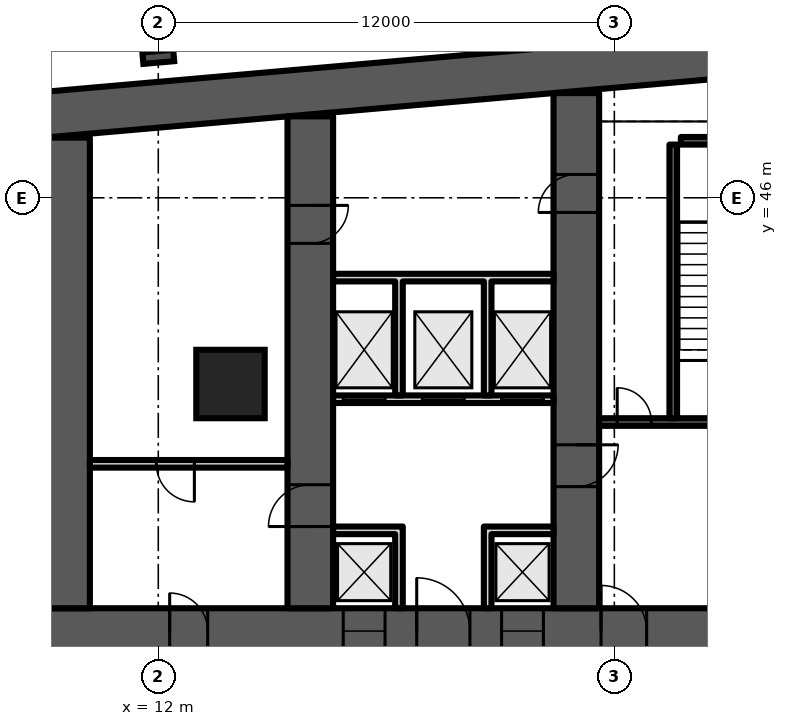
"""IFC4 building model, lengths in metres.
Left out: names, types, materials, properties, quantities, classifications, styles, units other than length and angle.
Written with IfcOpenShell. Run it as: python <this file> out.ifc"""

import sys

from ifc_helpers import new_model, si_unit, direction, frame, frame_2d, origin, origin_2d, place, context, subcontext, project, spatial, polyline, rectangle, i_section, outline, extrude, element, fill, save


model = new_model("IFC4")
c1 = context("Model", 3, precision=1e-05, world=origin(), true_north=direction((0.0, 1.0)))
c2 = subcontext(c1, "Body", "Model", "MODEL_VIEW")
j1 = project(units=[si_unit("LENGTHUNIT", "METRE"), si_unit("PLANEANGLEUNIT", "RADIAN")], contexts=[c1])
p1 = place(None, origin())
s1 = spatial("IfcSite", under=j1, at=p1, CompositionType="ELEMENT")
p2 = place(p1, origin())
s2 = spatial("IfcBuilding", under=s1, at=p2, CompositionType="ELEMENT")
p3 = place(p2, frame((0.0, 0.0, 91.9)))
s3 = spatial("IfcBuildingStorey", under=s2, at=p3, CompositionType="ELEMENT", Elevation=91.9)
p4 = place(p3, origin())
e1 = element("IfcWall", 1, at=p4, inside=s3, PredefinedType="SHEAR", context=c2, shape_type="SweptSolid", body=[
    extrude(outline(polyline([(9.0, 47.583), (37.0, 50.032), (65.0, 47.583), (65.0, 48.787), (37.0, 51.237), (9.0, 48.787), (9.0, 47.583)])), origin(), (0.0, 0.0, 1.0), 4.8),
])
p5 = place(p3, frame((9.0, 34.6, 0.0), z_axis=(0.0, 0.0, 1.0), x_axis=(1.0, 0.0, 0.0)))
e2 = element("IfcWall", 2, at=p5, inside=s3, PredefinedType="SHEAR", context=c2, shape_type="SweptSolid", body=[
    extrude(rectangle(XDim=56.0, YDim=1.2, at=frame_2d((28.0, 0.0))), origin(), (0.0, 0.0, 1.0), 4.8),
])
p6 = place(p5, frame((3.3, 0.0, 0.0)))
e3 = element("IfcOpeningElement", 3, at=p6, cuts=e2, PredefinedType="OPENING", context=c2, shape_type="SweptSolid", body=[
    extrude(rectangle(XDim=1.0, YDim=2.1, at=frame_2d((0.5, 1.05))), frame((0.0, 0.61, 0.0), z_axis=(0.0, -1.0, 0.0), x_axis=(1.0, 0.0, 0.0)), (0.0, 0.0, 1.0), 1.22),
])
p7 = place(p5, frame((7.867, 0.0, 0.0)))
e4 = element("IfcOpeningElement", 4, at=p7, cuts=e2, PredefinedType="OPENING", context=c2, shape_type="SweptSolid", body=[
    extrude(rectangle(XDim=1.1, YDim=2.1, at=frame_2d((0.55, 1.05))), frame((0.0, 0.61, 0.0), z_axis=(0.0, -1.0, 0.0), x_axis=(1.0, 0.0, 0.0)), (0.0, 0.0, 1.0), 1.22),
])
p8 = place(p5, frame((12.033, 0.0, 0.0)))
e5 = element("IfcOpeningElement", 5, at=p8, cuts=e2, PredefinedType="OPENING", context=c2, shape_type="SweptSolid", body=[
    extrude(rectangle(XDim=1.1, YDim=2.1, at=frame_2d((0.55, 1.05))), frame((0.0, 0.61, 0.0), z_axis=(0.0, -1.0, 0.0), x_axis=(1.0, 0.0, 0.0)), (0.0, 0.0, 1.0), 1.22),
])
p9 = place(p5, frame((9.8, 0.0, 0.0)))
e6 = element("IfcOpeningElement", 6, at=p9, cuts=e2, PredefinedType="OPENING", context=c2, shape_type="SweptSolid", body=[
    extrude(rectangle(XDim=1.4, YDim=2.1, at=frame_2d((0.7, 1.05))), frame((0.0, 0.61, 0.0), z_axis=(0.0, -1.0, 0.0), x_axis=(1.0, 0.0, 0.0)), (0.0, 0.0, 1.0), 1.22),
])
p10 = place(p5, frame((14.65, 0.0, 0.0)))
e7 = element("IfcOpeningElement", 7, at=p10, cuts=e2, PredefinedType="OPENING", context=c2, shape_type="SweptSolid", body=[
    extrude(rectangle(XDim=1.2, YDim=2.1, at=frame_2d((0.6, 1.05))), frame((0.0, 0.61, 0.0), z_axis=(0.0, -1.0, 0.0), x_axis=(1.0, 0.0, 0.0)), (0.0, 0.0, 1.0), 1.22),
])
p11 = place(p5, frame((21.867, 0.0, 0.0)))
e8 = element("IfcOpeningElement", 8, at=p11, cuts=e2, PredefinedType="OPENING", context=c2, shape_type="SweptSolid", body=[
    extrude(rectangle(XDim=1.1, YDim=2.1, at=frame_2d((0.55, 1.05))), frame((0.0, 0.61, 0.0), z_axis=(0.0, -1.0, 0.0), x_axis=(1.0, 0.0, 0.0)), (0.0, 0.0, 1.0), 1.22),
])
p12 = place(p5, frame((26.033, 0.0, 0.0)))
e9 = element("IfcOpeningElement", 9, at=p12, cuts=e2, PredefinedType="OPENING", context=c2, shape_type="SweptSolid", body=[
    extrude(rectangle(XDim=1.1, YDim=2.1, at=frame_2d((0.55, 1.05))), frame((0.0, 0.61, 0.0), z_axis=(0.0, -1.0, 0.0), x_axis=(1.0, 0.0, 0.0)), (0.0, 0.0, 1.0), 1.22),
])
p13 = place(p5, frame((23.8, 0.0, 0.0)))
e10 = element("IfcOpeningElement", 10, at=p13, cuts=e2, PredefinedType="OPENING", context=c2, shape_type="SweptSolid", body=[
    extrude(rectangle(XDim=1.4, YDim=2.1, at=frame_2d((0.7, 1.05))), frame((0.0, 0.61, 0.0), z_axis=(0.0, -1.0, 0.0), x_axis=(1.0, 0.0, 0.0)), (0.0, 0.0, 1.0), 1.22),
])
p14 = place(p5, frame((28.867, 0.0, 0.0)))
e11 = element("IfcOpeningElement", 11, at=p14, cuts=e2, PredefinedType="OPENING", context=c2, shape_type="SweptSolid", body=[
    extrude(rectangle(XDim=1.1, YDim=2.1, at=frame_2d((0.55, 1.05))), frame((0.0, 0.61, 0.0), z_axis=(0.0, -1.0, 0.0), x_axis=(1.0, 0.0, 0.0)), (0.0, 0.0, 1.0), 1.22),
])
p15 = place(p5, frame((33.033, 0.0, 0.0)))
e12 = element("IfcOpeningElement", 12, at=p15, cuts=e2, PredefinedType="OPENING", context=c2, shape_type="SweptSolid", body=[
    extrude(rectangle(XDim=1.1, YDim=2.1, at=frame_2d((0.55, 1.05))), frame((0.0, 0.61, 0.0), z_axis=(0.0, -1.0, 0.0), x_axis=(1.0, 0.0, 0.0)), (0.0, 0.0, 1.0), 1.22),
])
p16 = place(p5, frame((40.15, 0.0, 0.0)))
e13 = element("IfcOpeningElement", 13, at=p16, cuts=e2, PredefinedType="OPENING", context=c2, shape_type="SweptSolid", body=[
    extrude(rectangle(XDim=1.2, YDim=2.1, at=frame_2d((0.6, 1.05))), frame((0.0, 0.61, 0.0), z_axis=(0.0, -1.0, 0.0), x_axis=(1.0, 0.0, 0.0)), (0.0, 0.0, 1.0), 1.22),
])
p17 = place(p5, frame((44.8, 0.0, 0.0)))
e14 = element("IfcOpeningElement", 14, at=p17, cuts=e2, PredefinedType="OPENING", context=c2, shape_type="SweptSolid", body=[
    extrude(rectangle(XDim=1.4, YDim=2.1, at=frame_2d((0.7, 1.05))), frame((0.0, 0.61, 0.0), z_axis=(0.0, -1.0, 0.0), x_axis=(1.0, 0.0, 0.0)), (0.0, 0.0, 1.0), 1.22),
])
p18 = place(p5, frame((49.867, 0.0, 0.0)))
e15 = element("IfcOpeningElement", 15, at=p18, cuts=e2, PredefinedType="OPENING", context=c2, shape_type="SweptSolid", body=[
    extrude(rectangle(XDim=1.1, YDim=2.1, at=frame_2d((0.55, 1.05))), frame((0.0, 0.61, 0.0), z_axis=(0.0, -1.0, 0.0), x_axis=(1.0, 0.0, 0.0)), (0.0, 0.0, 1.0), 1.22),
])
p19 = place(p5, frame((53.5, 0.0, 0.0)))
e16 = element("IfcOpeningElement", 16, at=p19, cuts=e2, PredefinedType="OPENING", context=c2, shape_type="SweptSolid", body=[
    extrude(rectangle(XDim=1.1, YDim=2.1, at=frame_2d((0.55, 1.05))), frame((0.0, 0.61, 0.0), z_axis=(0.0, -1.0, 0.0), x_axis=(1.0, 0.0, 0.0)), (0.0, 0.0, 1.0), 1.22),
])
p20 = place(p5, frame((51.567, 0.0, 0.0)))
e17 = element("IfcOpeningElement", 17, at=p20, cuts=e2, PredefinedType="OPENING", context=c2, shape_type="SweptSolid", body=[
    extrude(rectangle(XDim=1.4, YDim=2.1, at=frame_2d((0.7, 1.05))), frame((0.0, 0.61, 0.0), z_axis=(0.0, -1.0, 0.0), x_axis=(1.0, 0.0, 0.0)), (0.0, 0.0, 1.0), 1.22),
])
p21 = place(p3, frame((9.6, 35.2, 0.0), z_axis=(0.0, 0.0, 1.0), x_axis=(0.0, 1.0, 0.0)))
e18 = element("IfcWall", 18, at=p21, inside=s3, PredefinedType="SHEAR", context=c2, shape_type="SweptSolid", body=[
    extrude(rectangle(XDim=12.383, YDim=1.2, at=frame_2d((6.191, 0.0))), origin(), (0.0, 0.0, 1.0), 4.8),
])
p22 = place(p3, frame((16.0, 35.2, 0.0), z_axis=(0.0, 0.0, 1.0), x_axis=(0.0, 1.0, 0.0)))
e19 = element("IfcWall", 19, at=p22, inside=s3, PredefinedType="SHEAR", context=c2, shape_type="SweptSolid", body=[
    extrude(rectangle(XDim=12.943, YDim=1.2, at=frame_2d((6.471, 0.0))), origin(), (0.0, 0.0, 1.0), 4.8),
])
p23 = place(p22, frame((2.15, 0.0, 0.0)))
e20 = element("IfcOpeningElement", 20, at=p23, cuts=e19, PredefinedType="OPENING", context=c2, shape_type="SweptSolid", body=[
    extrude(rectangle(XDim=1.1, YDim=2.1, at=frame_2d((0.55, 1.05))), frame((0.0, 0.61, 0.0), z_axis=(0.0, -1.0, 0.0), x_axis=(1.0, 0.0, 0.0)), (0.0, 0.0, 1.0), 1.22),
])
p24 = place(p22, frame((9.6, 0.0, 0.0)))
e21 = element("IfcOpeningElement", 21, at=p24, cuts=e19, PredefinedType="OPENING", context=c2, shape_type="SweptSolid", body=[
    extrude(rectangle(XDim=1.0, YDim=2.1, at=frame_2d((0.5, 1.05))), frame((0.0, 0.61, 0.0), z_axis=(0.0, -1.0, 0.0), x_axis=(1.0, 0.0, 0.0)), (0.0, 0.0, 1.0), 1.22),
])
p25 = place(p3, frame((23.0, 35.2, 0.0), z_axis=(0.0, 0.0, 1.0), x_axis=(0.0, 1.0, 0.0)))
e22 = element("IfcWall", 22, at=p25, inside=s3, PredefinedType="SHEAR", context=c2, shape_type="SweptSolid", body=[
    extrude(rectangle(XDim=13.555, YDim=1.2, at=frame_2d((6.778, 0.0))), origin(), (0.0, 0.0, 1.0), 4.8),
])
p26 = place(p25, frame((10.414, 0.0, 0.0)))
e23 = element("IfcOpeningElement", 23, at=p26, cuts=e22, PredefinedType="OPENING", context=c2, shape_type="SweptSolid", body=[
    extrude(rectangle(XDim=1.0, YDim=2.1, at=frame_2d((0.5, 1.05))), frame((0.0, 0.61, 0.0), z_axis=(0.0, -1.0, 0.0), x_axis=(1.0, 0.0, 0.0)), (0.0, 0.0, 1.0), 1.22),
])
p27 = place(p25, frame((3.2, 0.0, 0.0)))
e24 = element("IfcOpeningElement", 24, at=p27, cuts=e22, PredefinedType="OPENING", context=c2, shape_type="SweptSolid", body=[
    extrude(rectangle(XDim=1.1, YDim=2.1, at=frame_2d((0.55, 1.05))), frame((0.0, 0.61, 0.0), z_axis=(0.0, -1.0, 0.0), x_axis=(1.0, 0.0, 0.0)), (0.0, 0.0, 1.0), 1.22),
])
p28 = place(p3, frame((13.9, 41.1, 0.0), z_axis=(0.0, 0.0, 1.0), x_axis=(1.0, 0.0, 0.0)))
e25 = element("IfcColumn", 25, at=p28, inside=s3, PredefinedType="COLUMN", context=c2, shape_type="SweptSolid", body=[
    extrude(rectangle(XDim=1.8, YDim=1.8, at=origin_2d()), origin(), (0.0, 0.0, 1.0), 4.8),
])
p29 = place(p3, frame((12.0, 49.71, 0.0), z_axis=(0.0, 0.0, 1.0), x_axis=(-0.087156, 0.996197, 0.0)))
e26 = element("IfcColumn", 26, at=p29, inside=s3, PredefinedType="COLUMN", context=c2, shape_type="SweptSolid", body=[
    extrude(i_section(OverallWidth=0.303, OverallDepth=0.814, WebThickness=0.021, FlangeThickness=0.04, FilletRadius=0.03, at=origin_2d()), origin(), (0.0, 0.0, 1.0), 4.8),
])
p30 = place(p3, frame((10.2, 39.0, 0.0), z_axis=(0.0, 0.0, 1.0), x_axis=(1.0, 0.0, 0.0)))
e27 = element("IfcWall", 27, at=p30, inside=s3, PredefinedType="PARTITIONING", context=c2, shape_type="SweptSolid", body=[
    extrude(rectangle(XDim=5.2, YDim=0.2, at=frame_2d((2.6, 0.0))), origin(), (0.0, 0.0, 1.0), 4.4),
])
p31 = place(p30, frame((1.75, 0.0, 0.0)))
e28 = element("IfcOpeningElement", 28, at=p31, cuts=e27, PredefinedType="OPENING", context=c2, shape_type="SweptSolid", body=[
    extrude(rectangle(XDim=1.0, YDim=2.1, at=frame_2d((0.5, 1.05))), frame((0.0, 0.11, 0.0), z_axis=(0.0, -1.0, 0.0), x_axis=(1.0, 0.0, 0.0)), (0.0, 0.0, 1.0), 0.22),
])
p32 = place(p3, frame((16.6, 40.7, 0.0), z_axis=(0.0, 0.0, 1.0), x_axis=(1.0, 0.0, 0.0)))
e29 = element("IfcWall", 29, at=p32, inside=s3, PredefinedType="PARTITIONING", context=c2, shape_type="SweptSolid", body=[
    extrude(rectangle(XDim=5.8, YDim=0.2, at=frame_2d((2.9, 0.0))), origin(), (0.0, 0.0, 1.0), 4.4),
])
p33 = place(p32, frame((0.267, 0.0, 0.0)))
e30 = element("IfcOpeningElement", 30, at=p33, cuts=e29, PredefinedType="OPENING", context=c2, shape_type="SweptSolid", body=[
    extrude(rectangle(XDim=1.1, YDim=2.1, at=frame_2d((0.55, 1.05))), frame((0.0, 0.11, 0.0), z_axis=(0.0, -1.0, 0.0), x_axis=(1.0, 0.0, 0.0)), (0.0, 0.0, 1.0), 0.22),
])
p34 = place(p32, frame((2.35, 0.0, 0.0)))
e31 = element("IfcOpeningElement", 31, at=p34, cuts=e29, PredefinedType="OPENING", context=c2, shape_type="SweptSolid", body=[
    extrude(rectangle(XDim=1.1, YDim=2.1, at=frame_2d((0.55, 1.05))), frame((0.0, 0.11, 0.0), z_axis=(0.0, -1.0, 0.0), x_axis=(1.0, 0.0, 0.0)), (0.0, 0.0, 1.0), 0.22),
])
p35 = place(p32, frame((4.433, 0.0, 0.0)))
e32 = element("IfcOpeningElement", 32, at=p35, cuts=e29, PredefinedType="OPENING", context=c2, shape_type="SweptSolid", body=[
    extrude(rectangle(XDim=1.1, YDim=2.1, at=frame_2d((0.55, 1.05))), frame((0.0, 0.11, 0.0), z_axis=(0.0, -1.0, 0.0), x_axis=(1.0, 0.0, 0.0)), (0.0, 0.0, 1.0), 0.22),
])
p36 = place(p3, origin())
e33 = element("IfcWall", 33, at=p36, inside=s3, PredefinedType="PARTITIONING", context=c2, shape_type="SweptSolid", body=[
    extrude(outline(polyline([(18.233, 37.15), (16.6, 37.15), (16.6, 37.35), (18.233, 37.35), (18.433, 37.35), (18.433, 35.2), (18.233, 35.2), (18.233, 37.15)])), origin(), (0.0, 0.0, 1.0), 4.4),
])
p37 = place(p3, origin())
e34 = element("IfcWall", 34, at=p37, inside=s3, PredefinedType="PARTITIONING", context=c2, shape_type="SweptSolid", body=[
    extrude(outline(polyline([(20.567, 37.35), (20.767, 37.35), (22.4, 37.35), (22.4, 37.15), (20.767, 37.15), (20.767, 35.2), (20.567, 35.2), (20.567, 37.35)])), origin(), (0.0, 0.0, 1.0), 4.4),
])
p38 = place(p3, origin())
e35 = element("IfcWall", 35, at=p38, inside=s3, PredefinedType="PARTITIONING", context=c2, shape_type="SweptSolid", body=[
    extrude(outline(polyline([(18.433, 40.8), (18.233, 40.8), (18.233, 43.8), (16.6, 43.8), (16.6, 44.0), (22.4, 44.0), (22.4, 43.8), (20.767, 43.8), (20.767, 40.8), (20.567, 40.8), (20.567, 43.8), (18.433, 43.8), (18.433, 40.8)])), origin(), (0.0, 0.0, 1.0), 4.4),
])
p39 = place(p3, frame((23.6, 40.1, 0.0), z_axis=(0.0, 0.0, 1.0), x_axis=(1.0, 0.0, 0.0)))
e36 = element("IfcWall", 36, at=p39, inside=s3, PredefinedType="SHEAR", context=c2, shape_type="SweptSolid", body=[
    extrude(rectangle(XDim=5.8, YDim=0.2, at=frame_2d((2.9, 0.0))), origin(), (0.0, 0.0, 1.0), 4.4),
])
p40 = place(p39, frame((3.325, 0.0, 0.0)))
e37 = element("IfcOpeningElement", 37, at=p40, cuts=e36, PredefinedType="OPENING", context=c2, shape_type="SweptSolid", body=[
    extrude(rectangle(XDim=1.2, YDim=2.1, at=frame_2d((0.6, 1.05))), frame((0.0, 0.11, 0.0), z_axis=(0.0, -1.0, 0.0), x_axis=(1.0, 0.0, 0.0)), (0.0, 0.0, 1.0), 0.22),
])
p41 = place(p39, frame((0.475, 0.0, 0.0)))
e38 = element("IfcOpeningElement", 38, at=p41, cuts=e36, PredefinedType="OPENING", context=c2, shape_type="SweptSolid", body=[
    extrude(rectangle(XDim=0.9, YDim=2.1, at=frame_2d((0.45, 1.05))), frame((0.0, 0.11, 0.0), z_axis=(0.0, -1.0, 0.0), x_axis=(1.0, 0.0, 0.0)), (0.0, 0.0, 1.0), 0.22),
])
p42 = place(p3, frame((25.55, 40.2, 0.0), z_axis=(0.0, 0.0, 1.0), x_axis=(0.0, 1.0, 0.0)))
e39 = element("IfcWall", 39, at=p42, inside=s3, PredefinedType="SHEAR", context=c2, shape_type="SweptSolid", body=[
    extrude(rectangle(XDim=7.2, YDim=0.2, at=frame_2d((3.6, 0.0))), origin(), (0.0, 0.0, 1.0), 4.4),
])
p43 = place(p3, frame((25.75, 47.5, 0.0), z_axis=(0.0, 0.0, 1.0), x_axis=(1.0, 0.0, 0.0)))
e40 = element("IfcWall", 40, at=p43, inside=s3, PredefinedType="SHEAR", context=c2, shape_type="SweptSolid", body=[
    extrude(rectangle(XDim=3.65, YDim=0.2, at=frame_2d((1.825, 0.0))), origin(), (0.0, 0.0, 1.0), 4.4),
])
p44 = place(p6, origin())
e41 = element("IfcDoor", 41, at=p44, inside=s3, OperationType="SINGLE_SWING_LEFT", PredefinedType="DOOR", context=c2, shape_type="SweptSolid", body=[
    extrude(rectangle(XDim=1.0, YDim=2.1, at=frame_2d((0.5, 1.05))), frame((0.0, 0.6, 0.0), z_axis=(0.0, -1.0, 0.0), x_axis=(1.0, 0.0, 0.0)), (0.0, 0.0, 1.0), 1.199),
])
fill(e3, e41)
p45 = place(p31, origin())
e42 = element("IfcDoor", 42, at=p45, inside=s3, OperationType="SINGLE_SWING_RIGHT", PredefinedType="DOOR", context=c2, shape_type="SweptSolid", body=[
    extrude(rectangle(XDim=1.0, YDim=2.1, at=frame_2d((0.5, 1.05))), frame((0.0, 0.025, 0.0), z_axis=(0.0, -1.0, 0.0), x_axis=(1.0, 0.0, 0.0)), (0.0, 0.0, 1.0), 0.05),
])
fill(e28, e42)
p46 = place(p7, origin())
e43 = element("IfcDoor", 43, at=p46, inside=s3, OperationType="DOUBLE_DOOR_SLIDING", PredefinedType="DOOR", context=c2, shape_type="SweptSolid", body=[
    extrude(rectangle(XDim=1.1, YDim=2.1, at=frame_2d((0.55, 1.05))), frame((0.0, 0.025, 0.0), z_axis=(0.0, -1.0, 0.0), x_axis=(1.0, 0.0, 0.0)), (0.0, 0.0, 1.0), 0.05),
])
fill(e4, e43)
p47 = place(p8, origin())
e44 = element("IfcDoor", 44, at=p47, inside=s3, OperationType="DOUBLE_DOOR_SLIDING", PredefinedType="DOOR", context=c2, shape_type="SweptSolid", body=[
    extrude(rectangle(XDim=1.1, YDim=2.1, at=frame_2d((0.55, 1.05))), frame((0.0, 0.025, 0.0), z_axis=(0.0, -1.0, 0.0), x_axis=(1.0, 0.0, 0.0)), (0.0, 0.0, 1.0), 0.05),
])
fill(e5, e44)
p48 = place(p9, origin())
e45 = element("IfcDoor", 45, at=p48, inside=s3, OperationType="DOUBLE_DOOR_SINGLE_SWING", PredefinedType="DOOR", context=c2, shape_type="SweptSolid", body=[
    extrude(rectangle(XDim=1.4, YDim=2.1, at=frame_2d((0.7, 1.05))), frame((0.0, 0.025, 0.0), z_axis=(0.0, -1.0, 0.0), x_axis=(1.0, 0.0, 0.0)), (0.0, 0.0, 1.0), 0.05),
])
fill(e6, e45)
p49 = place(p33, origin())
e46 = element("IfcDoor", 46, at=p49, inside=s3, OperationType="DOUBLE_DOOR_SLIDING", PredefinedType="DOOR", context=c2, shape_type="SweptSolid", body=[
    extrude(rectangle(XDim=1.1, YDim=2.1, at=frame_2d((0.55, 1.05))), frame((0.0, 0.025, 0.0), z_axis=(0.0, -1.0, 0.0), x_axis=(1.0, 0.0, 0.0)), (0.0, 0.0, 1.0), 0.05),
])
fill(e30, e46)
p50 = place(p34, origin())
e47 = element("IfcDoor", 47, at=p50, inside=s3, OperationType="DOUBLE_DOOR_SLIDING", PredefinedType="DOOR", context=c2, shape_type="SweptSolid", body=[
    extrude(rectangle(XDim=1.1, YDim=2.1, at=frame_2d((0.55, 1.05))), frame((0.0, 0.025, 0.0), z_axis=(0.0, -1.0, 0.0), x_axis=(1.0, 0.0, 0.0)), (0.0, 0.0, 1.0), 0.05),
])
fill(e31, e47)
p51 = place(p35, origin())
e48 = element("IfcDoor", 48, at=p51, inside=s3, OperationType="DOUBLE_DOOR_SLIDING", PredefinedType="DOOR", context=c2, shape_type="SweptSolid", body=[
    extrude(rectangle(XDim=1.1, YDim=2.1, at=frame_2d((0.55, 1.05))), frame((0.0, 0.025, 0.0), z_axis=(0.0, -1.0, 0.0), x_axis=(1.0, 0.0, 0.0)), (0.0, 0.0, 1.0), 0.05),
])
fill(e32, e48)
p52 = place(p26, origin())
e49 = element("IfcDoor", 49, at=p52, inside=s3, OperationType="SINGLE_SWING_LEFT", PredefinedType="DOOR", context=c2, shape_type="SweptSolid", body=[
    extrude(rectangle(XDim=1.0, YDim=2.1, at=frame_2d((0.5, 1.05))), frame((0.0, 0.6, 0.0), z_axis=(0.0, -1.0, 0.0), x_axis=(1.0, 0.0, 0.0)), (0.0, 0.0, 1.0), 1.199),
])
fill(e23, e49)
p53 = place(p41, origin())
e50 = element("IfcDoor", 50, at=p53, inside=s3, OperationType="SINGLE_SWING_LEFT", PredefinedType="DOOR", context=c2, shape_type="SweptSolid", body=[
    extrude(rectangle(XDim=0.9, YDim=2.1, at=frame_2d((0.45, 1.05))), frame((0.0, 0.025, 0.0), z_axis=(0.0, -1.0, 0.0), x_axis=(1.0, 0.0, 0.0)), (0.0, 0.0, 1.0), 0.05),
])
fill(e38, e50)
p54 = place(p10, origin())
e51 = element("IfcDoor", 51, at=p54, inside=s3, OperationType="SINGLE_SWING_LEFT", PredefinedType="DOOR", context=c2, shape_type="SweptSolid", body=[
    extrude(rectangle(XDim=1.2, YDim=2.1, at=frame_2d((0.6, 1.05))), frame((0.0, 0.025, 0.0), z_axis=(0.0, -1.0, 0.0), x_axis=(1.0, 0.0, 0.0)), (0.0, 0.0, 1.0), 0.05),
])
fill(e7, e51)
p55 = place(p23, origin())
e52 = element("IfcDoor", 52, at=p55, inside=s3, OperationType="SINGLE_SWING_LEFT", PredefinedType="DOOR", context=c2, shape_type="SweptSolid", body=[
    extrude(rectangle(XDim=1.1, YDim=2.1, at=frame_2d((0.55, 1.05))), frame((0.0, 0.025, 0.0), z_axis=(0.0, -1.0, 0.0), x_axis=(1.0, 0.0, 0.0)), (0.0, 0.0, 1.0), 0.05),
])
fill(e20, e52)
p56 = place(p24, origin())
e53 = element("IfcDoor", 53, at=p56, inside=s3, OperationType="SINGLE_SWING_RIGHT", PredefinedType="DOOR", context=c2, shape_type="SweptSolid", body=[
    extrude(rectangle(XDim=1.0, YDim=2.1, at=frame_2d((0.5, 1.05))), frame((0.0, 0.6, 0.0), z_axis=(0.0, -1.0, 0.0), x_axis=(1.0, 0.0, 0.0)), (0.0, 0.0, 1.0), 1.199),
])
fill(e21, e53)
p57 = place(p27, origin())
e54 = element("IfcDoor", 54, at=p57, inside=s3, OperationType="SINGLE_SWING_RIGHT", PredefinedType="DOOR", context=c2, shape_type="SweptSolid", body=[
    extrude(rectangle(XDim=1.1, YDim=2.1, at=frame_2d((0.55, 1.05))), frame((0.0, 0.025, 0.0), z_axis=(0.0, -1.0, 0.0), x_axis=(1.0, 0.0, 0.0)), (0.0, 0.0, 1.0), 0.05),
])
fill(e24, e54)
save(model, sys.argv[1])
